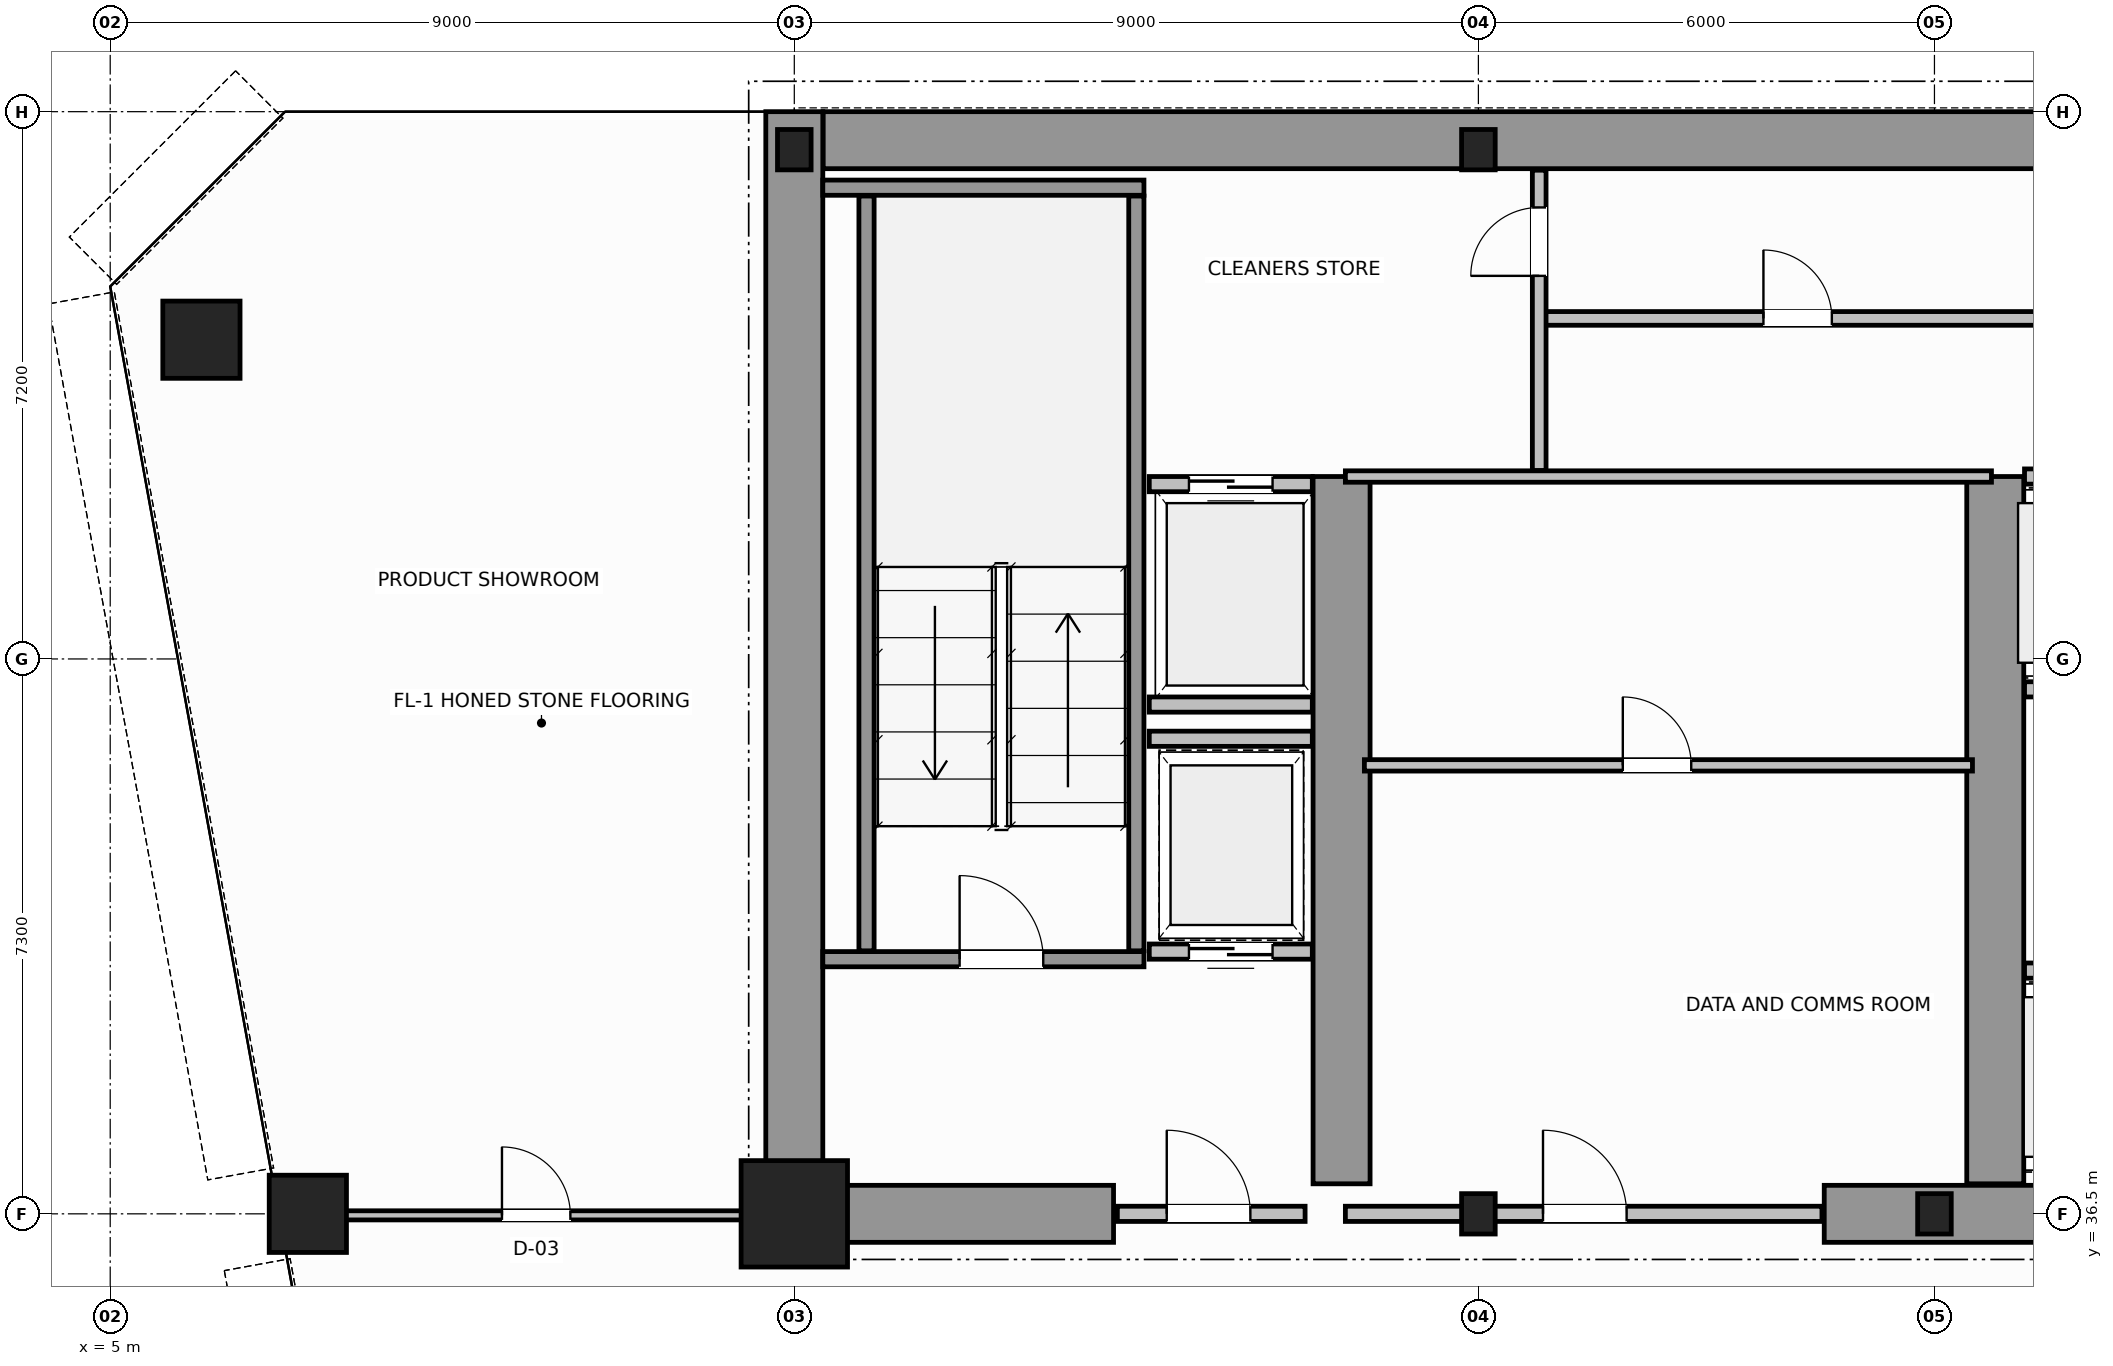
"""IFC4 building model, lengths in metres.
Left out: names, types, materials, properties, quantities, classifications, styles, units other than length and angle.
Written with IfcOpenShell. Run it as: python <this file> out.ifc"""

import sys

from ifc_helpers import new_model, si_unit, direction, frame, frame_2d, origin, origin_2d, place, context, subcontext, project, spatial, rectangle, hollow_circle, i_section, extrude, source, transform, mapped, element, fill, save


model = new_model("IFC4")
c1 = context("Model", 3, precision=1e-05, world=origin(), true_north=direction((0.0, 1.0)))
c2 = subcontext(c1, "Body", "Model", "MODEL_VIEW")
j1 = project(units=[si_unit("LENGTHUNIT", "METRE"), si_unit("PLANEANGLEUNIT", "RADIAN")], contexts=[c1])
p1 = place(None, origin())
s1 = spatial("IfcSite", under=j1, at=p1, CompositionType="ELEMENT")
p2 = place(p1, origin())
s2 = spatial("IfcBuilding", under=s1, at=p2, CompositionType="ELEMENT")
p3 = place(p2, frame((0.0, 0.0, 122.4)))
s3 = spatial("IfcBuildingStorey", under=s2, at=p3, CompositionType="ELEMENT", Elevation=122.4)
m1 = source(origin(), c2, "Body", "SweptSolid", [
    extrude(rectangle(XDim=1.4, YDim=1.4, at=origin_2d()), origin(), (0.0, 0.0, 1.0), 3.8),
])
p4 = place(p3, frame((14.0, 36.5, 0.0), z_axis=(0.0, 0.0, 1.0), x_axis=(1.0, 0.0, 0.0)))
e1 = element("IfcColumn", 1, at=p4, inside=s3, PredefinedType="COLUMN", context=c2, shape_type="MappedRepresentation", body=[
    mapped(m1, transform((0.0, 0.0, 0.0), scale=1.0)),
])
m2 = source(origin(), c2, "Body", "SweptSolid", [
    extrude(i_section(OverallWidth=0.442, OverallDepth=0.531, WebThickness=0.065, FlangeThickness=0.076, FilletRadius=0.015, at=origin_2d()), origin(), (0.0, 0.0, 1.0), 3.8),
])
for number, where, z_axis, x_axis in (
    (2, (23.0, 36.5, 0.0), (0.0, 0.0, 1.0), (1.0, 0.0, 0.0)),
    (3, (29.0, 36.5, 0.0), (0.0, 0.0, 1.0), (1.0, 0.0, 0.0)),
    (4, (14.0, 50.5, 0.0), (0.0, 0.0, 1.0), (1.0, 0.0, 0.0)),
    (5, (23.0, 50.5, 0.0), (0.0, 0.0, 1.0), (1.0, 0.0, 0.0)),
):
    element("IfcColumn", number, at=place(p3, frame(where, z_axis=z_axis, x_axis=x_axis)), inside=s3, PredefinedType="COLUMN", context=c2, shape_type="MappedRepresentation", body=[
        mapped(m2, transform((0.0, 0.0, 0.0), scale=1.0)),
    ])
m3 = source(origin(), c2, "Body", "SweptSolid", [
    extrude(hollow_circle(Radius=0.508, WallThickness=0.045, at=origin_2d()), origin(), (0.0, 0.0, 1.0), 3.8),
])
for number, where, z_axis, x_axis in (
    (6, (6.2, 48.0, 0.0), (0.0, 0.0, 1.0), (1.0, 0.0, 0.0)),
    (7, (7.6, 36.5, 0.0), (0.0, 0.0, 1.0), (1.0, 0.0, 0.0)),
):
    element("IfcColumn", number, at=place(p3, frame(where, z_axis=z_axis, x_axis=x_axis)), inside=s3, PredefinedType="COLUMN", context=c2, shape_type="MappedRepresentation", body=[
        mapped(m3, transform((0.0, 0.0, 0.0), scale=1.0)),
    ])
p5 = place(p3, frame((14.379, 50.625, 0.0), z_axis=(0.0, 0.0, 1.0), x_axis=(1.0, 0.0, 0.0)))
e8 = element("IfcWall", 8, at=p5, inside=s3, PredefinedType="SHEAR", context=c2, shape_type="SweptSolid", body=[
    extrude(rectangle(XDim=19.619, YDim=0.75, at=frame_2d((9.81, 0.0))), origin(), (0.0, 0.0, 1.0), 3.8),
])
p6 = place(p3, frame((14.0, 36.5, 0.0), z_axis=(0.0, 0.0, 1.0), x_axis=(0.0, 1.0, 0.0)))
e9 = element("IfcWall", 9, at=p6, inside=s3, PredefinedType="SHEAR", context=c2, shape_type="SweptSolid", body=[
    extrude(rectangle(XDim=14.5, YDim=0.75, at=frame_2d((7.25, 0.0))), origin(), (0.0, 0.0, 1.0), 3.8),
])
p7 = place(p3, frame((14.395, 36.5, 0.0), z_axis=(0.0, 0.0, 1.0), x_axis=(1.0, 0.0, 0.0)))
e10 = element("IfcWall", 10, at=p7, inside=s3, PredefinedType="SHEAR", context=c2, shape_type="SweptSolid", body=[
    extrude(rectangle(XDim=3.805, YDim=0.75, at=frame_2d((1.902, 0.0))), origin(), (0.0, 0.0, 1.0), 2.38),
])
p8 = place(p3, frame((27.55, 36.5, 0.0), z_axis=(0.0, 0.0, 1.0), x_axis=(1.0, 0.0, 0.0)))
e11 = element("IfcWall", 11, at=p8, inside=s3, PredefinedType="SHEAR", context=c2, shape_type="SweptSolid", body=[
    extrude(rectangle(XDim=4.5, YDim=0.75, at=frame_2d((2.25, 0.0))), origin(), (0.0, 0.0, 1.0), 3.8),
])
for number, where, z_axis, x_axis in (
    (12, (21.2, 36.895, 0.0), (0.0, 0.0, 1.0), (0.0, 1.0, 0.0)),
    (13, (29.8, 36.895, 0.0), (0.0, 0.0, 1.0), (0.0, 1.0, 0.0)),
):
    element("IfcWall", number, at=place(p3, frame(where, z_axis=z_axis, x_axis=x_axis)), inside=s3, PredefinedType="SHEAR", context=c2, shape_type="SweptSolid", body=[
        extrude(rectangle(XDim=9.305, YDim=0.75, at=frame_2d((4.652, 0.0))), origin(), (0.0, 0.0, 1.0), 3.8),
    ])
p9 = place(p3, frame((14.375, 39.85, 0.0), z_axis=(0.0, 0.0, 1.0), x_axis=(1.0, 0.0, 0.0)))
e14 = element("IfcWall", 14, at=p9, inside=s3, PredefinedType="SOLIDWALL", context=c2, shape_type="SweptSolid", body=[
    extrude(rectangle(XDim=4.225, YDim=0.2, at=frame_2d((2.113, 0.0))), origin(), (0.0, 0.0, 1.0), 3.8),
])
p10 = place(p9, frame((1.8, 0.0, 0.0)))
e15 = element("IfcOpeningElement", 15, at=p10, cuts=e14, PredefinedType="OPENING", context=c2, shape_type="SweptSolid", body=[
    extrude(rectangle(XDim=1.1, YDim=2.15, at=frame_2d((0.55, 1.075))), frame((0.0, 0.11, 0.0), z_axis=(0.0, -1.0, 0.0), x_axis=(1.0, 0.0, 0.0)), (0.0, 0.0, 1.0), 0.22),
])
p11 = place(p3, frame((14.375, 50.0, 0.0), z_axis=(0.0, 0.0, 1.0), x_axis=(1.0, 0.0, 0.0)))
e16 = element("IfcWall", 16, at=p11, inside=s3, PredefinedType="SOLIDWALL", context=c2, shape_type="SweptSolid", body=[
    extrude(rectangle(XDim=4.225, YDim=0.2, at=frame_2d((2.113, 0.0))), origin(), (0.0, 0.0, 1.0), 3.8),
])
for number, where, z_axis, x_axis in (
    (17, (14.95, 39.96, 0.0), (0.0, 0.0, 1.0), (0.0, 1.0, 0.0)),
    (18, (18.5, 39.96, 0.0), (0.0, 0.0, 1.0), (0.0, 1.0, 0.0)),
):
    element("IfcWall", number, at=place(p3, frame(where, z_axis=z_axis, x_axis=x_axis)), inside=s3, PredefinedType="SOLIDWALL", context=c2, shape_type="SweptSolid", body=[
        extrude(rectangle(XDim=9.93, YDim=0.2, at=frame_2d((4.965, 0.0))), origin(), (0.0, 0.0, 1.0), 3.8),
    ])
p12 = place(p3, frame((18.25, 36.5, 0.0), z_axis=(0.0, 0.0, 1.0), x_axis=(1.0, 0.0, 0.0)))
e19 = element("IfcWall", 19, at=p12, inside=s3, PredefinedType="SOLIDWALL", context=c2, shape_type="SweptSolid", body=[
    extrude(rectangle(XDim=2.47, YDim=0.2, at=frame_2d((1.235, 0.0))), origin(), (0.0, 0.0, 1.0), 2.37),
])
p13 = place(p12, frame((0.65, 0.0, 0.0)))
e20 = element("IfcOpeningElement", 20, at=p13, cuts=e19, PredefinedType="OPENING", context=c2, shape_type="SweptSolid", body=[
    extrude(rectangle(XDim=1.1, YDim=2.15, at=frame_2d((0.55, 1.075))), frame((0.0, 0.11, 0.0), z_axis=(0.0, -1.0, 0.0), x_axis=(1.0, 0.0, 0.0)), (0.0, 0.0, 1.0), 0.22),
])
p14 = place(p3, frame((30.185, 39.7, 0.0), z_axis=(0.0, 0.0, 1.0), x_axis=(1.0, 0.0, 0.0)))
e21 = element("IfcWall", 21, at=p14, inside=s3, PredefinedType="SOLIDWALL", context=c2, shape_type="SweptSolid", body=[
    extrude(rectangle(XDim=1.845, YDim=0.2, at=frame_2d((0.922, 0.0))), origin(), (0.0, 0.0, 1.0), 3.58),
])
p15 = place(p14, frame((0.373, 0.0, 0.0)))
e22 = element("IfcOpeningElement", 22, at=p15, cuts=e21, PredefinedType="OPENING", context=c2, shape_type="SweptSolid", body=[
    extrude(rectangle(XDim=1.1, YDim=2.15, at=frame_2d((0.55, 1.075))), frame((0.0, 0.11, 0.0), z_axis=(0.0, -1.0, 0.0), x_axis=(1.0, 0.0, 0.0)), (0.0, 0.0, 1.0), 0.22),
])
p16 = place(p3, frame((30.185, 43.4, 0.0), z_axis=(0.0, 0.0, 1.0), x_axis=(1.0, 0.0, 0.0)))
e23 = element("IfcWall", 23, at=p16, inside=s3, PredefinedType="SOLIDWALL", context=c2, shape_type="SweptSolid", body=[
    extrude(rectangle(XDim=1.725, YDim=0.2, at=frame_2d((0.862, 0.0))), origin(), (0.0, 0.0, 1.0), 3.58),
])
p17 = place(p16, frame((0.313, 0.0, 0.0)))
e24 = element("IfcOpeningElement", 24, at=p17, cuts=e23, PredefinedType="OPENING", context=c2, shape_type="SweptSolid", body=[
    extrude(rectangle(XDim=1.1, YDim=2.15, at=frame_2d((0.55, 1.075))), frame((0.0, 0.11, 0.0), z_axis=(0.0, -1.0, 0.0), x_axis=(1.0, 0.0, 0.0)), (0.0, 0.0, 1.0), 0.22),
])
p18 = place(p3, frame((30.185, 46.2, 0.0), z_axis=(0.0, 0.0, 1.0), x_axis=(1.0, 0.0, 0.0)))
e25 = element("IfcWall", 25, at=p18, inside=s3, PredefinedType="SOLIDWALL", context=c2, shape_type="SweptSolid", body=[
    extrude(rectangle(XDim=1.725, YDim=0.2, at=frame_2d((0.862, 0.0))), origin(), (0.0, 0.0, 1.0), 3.58),
])
p19 = place(p3, frame((18.67, 46.1, 0.0), z_axis=(0.0, 0.0, 1.0), x_axis=(1.0, 0.0, 0.0)))
e26 = element("IfcWall", 26, at=p19, inside=s3, PredefinedType="SOLIDWALL", context=c2, shape_type="SweptSolid", body=[
    extrude(rectangle(XDim=2.145, YDim=0.2, at=frame_2d((1.073, 0.0))), origin(), (0.0, 0.0, 1.0), 3.58),
])
p20 = place(p19, frame((0.522, 0.0, 0.0)))
e27 = element("IfcOpeningElement", 27, at=p20, cuts=e26, PredefinedType="OPENING", context=c2, shape_type="SweptSolid", body=[
    extrude(rectangle(XDim=1.1, YDim=2.15, at=frame_2d((0.55, 1.075))), frame((0.0, 0.11, 0.0), z_axis=(0.0, -1.0, 0.0), x_axis=(1.0, 0.0, 0.0)), (0.0, 0.0, 1.0), 0.22),
])
p21 = place(p3, frame((18.67, 43.2, 0.0), z_axis=(0.0, 0.0, 1.0), x_axis=(1.0, 0.0, 0.0)))
e28 = element("IfcWall", 28, at=p21, inside=s3, PredefinedType="SOLIDWALL", context=c2, shape_type="SweptSolid", body=[
    extrude(rectangle(XDim=2.145, YDim=0.2, at=frame_2d((1.073, 0.0))), origin(), (0.0, 0.0, 1.0), 3.58),
])
p22 = place(p3, frame((18.67, 39.95, 0.0), z_axis=(0.0, 0.0, 1.0), x_axis=(1.0, 0.0, 0.0)))
e29 = element("IfcWall", 29, at=p22, inside=s3, PredefinedType="SOLIDWALL", context=c2, shape_type="SweptSolid", body=[
    extrude(rectangle(XDim=2.145, YDim=0.2, at=frame_2d((1.073, 0.0))), origin(), (0.0, 0.0, 1.0), 3.58),
])
p23 = place(p22, frame((0.522, 0.0, 0.0)))
e30 = element("IfcOpeningElement", 30, at=p23, cuts=e29, PredefinedType="OPENING", context=c2, shape_type="SweptSolid", body=[
    extrude(rectangle(XDim=1.1, YDim=2.15, at=frame_2d((0.55, 1.075))), frame((0.0, 0.11, 0.0), z_axis=(0.0, -1.0, 0.0), x_axis=(1.0, 0.0, 0.0)), (0.0, 0.0, 1.0), 0.22),
])
p24 = place(p3, frame((18.67, 42.75, 0.0), z_axis=(0.0, 0.0, 1.0), x_axis=(1.0, 0.0, 0.0)))
e31 = element("IfcWall", 31, at=p24, inside=s3, PredefinedType="SOLIDWALL", context=c2, shape_type="SweptSolid", body=[
    extrude(rectangle(XDim=2.145, YDim=0.2, at=frame_2d((1.073, 0.0))), origin(), (0.0, 0.0, 1.0), 3.58),
])
p25 = place(p3, frame((21.25, 36.5, 0.0), z_axis=(0.0, 0.0, 1.0), x_axis=(1.0, 0.0, 0.0)))
e32 = element("IfcWall", 32, at=p25, inside=s3, PredefinedType="SOLIDWALL", context=c2, shape_type="SweptSolid", body=[
    extrude(rectangle(XDim=6.27, YDim=0.2, at=frame_2d((3.135, 0.0))), origin(), (0.0, 0.0, 1.0), 2.37),
])
p26 = place(p25, frame((2.6, 0.0, 0.0)))
e33 = element("IfcOpeningElement", 33, at=p26, cuts=e32, PredefinedType="OPENING", context=c2, shape_type="SweptSolid", body=[
    extrude(rectangle(XDim=1.1, YDim=2.15, at=frame_2d((0.55, 1.075))), frame((0.0, 0.11, 0.0), z_axis=(0.0, -1.0, 0.0), x_axis=(1.0, 0.0, 0.0)), (0.0, 0.0, 1.0), 0.22),
])
p27 = place(p3, frame((21.25, 46.2, 0.0), z_axis=(0.0, 0.0, 1.0), x_axis=(1.0, 0.0, 0.0)))
e34 = element("IfcWall", 34, at=p27, inside=s3, PredefinedType="PARTITIONING", context=c2, shape_type="SweptSolid", body=[
    extrude(rectangle(XDim=8.5, YDim=0.15, at=frame_2d((4.25, 0.0))), origin(), (0.0, 0.0, 1.0), 3.58),
])
p28 = place(p3, frame((21.5, 42.4, 0.0), z_axis=(0.0, 0.0, 1.0), x_axis=(1.0, 0.0, 0.0)))
e35 = element("IfcWall", 35, at=p28, inside=s3, PredefinedType="PARTITIONING", context=c2, shape_type="SweptSolid", body=[
    extrude(rectangle(XDim=8.0, YDim=0.15, at=frame_2d((4.0, 0.0))), origin(), (0.0, 0.0, 1.0), 3.58),
])
p29 = place(p28, frame((3.4, 0.0, 0.0)))
e36 = element("IfcOpeningElement", 36, at=p29, cuts=e35, PredefinedType="OPENING", context=c2, shape_type="SweptSolid", body=[
    extrude(rectangle(XDim=0.9, YDim=2.1, at=frame_2d((0.45, 1.05))), frame((0.0, 0.085, 0.0), z_axis=(0.0, -1.0, 0.0), x_axis=(1.0, 0.0, 0.0)), (0.0, 0.0, 1.0), 0.17),
])
p30 = place(p3, frame((23.85, 48.28, 0.0), z_axis=(0.0, 0.0, 1.0), x_axis=(1.0, 0.0, 0.0)))
e37 = element("IfcWall", 37, at=p30, inside=s3, PredefinedType="PLUMBINGWALL", context=c2, shape_type="SweptSolid", body=[
    extrude(rectangle(XDim=15.03, YDim=0.18, at=frame_2d((7.515, 0.0))), origin(), (0.0, 0.0, 1.0), 3.58),
])
p31 = place(p30, frame((2.9, 0.0, 0.0)))
e38 = element("IfcOpeningElement", 38, at=p31, cuts=e37, PredefinedType="OPENING", context=c2, shape_type="SweptSolid", body=[
    extrude(rectangle(XDim=0.9, YDim=2.15, at=frame_2d((0.45, 1.075))), frame((0.0, 0.1, 0.0), z_axis=(0.0, -1.0, 0.0), x_axis=(1.0, 0.0, 0.0)), (0.0, 0.0, 1.0), 0.2),
])
p32 = place(p30, frame((10.4, 0.0, 0.0)))
e39 = element("IfcOpeningElement", 39, at=p32, cuts=e37, PredefinedType="OPENING", context=c2, shape_type="SweptSolid", body=[
    extrude(rectangle(XDim=0.9, YDim=2.15, at=frame_2d((0.45, 1.075))), frame((0.0, 0.1, 0.0), z_axis=(0.0, -1.0, 0.0), x_axis=(1.0, 0.0, 0.0)), (0.0, 0.0, 1.0), 0.2),
])
p33 = place(p3, frame((23.8, 46.28, 0.0), z_axis=(0.0, 0.0, 1.0), x_axis=(0.0, 1.0, 0.0)))
e40 = element("IfcWall", 40, at=p33, inside=s3, PredefinedType="PLUMBINGWALL", context=c2, shape_type="SweptSolid", body=[
    extrude(rectangle(XDim=3.95, YDim=0.18, at=frame_2d((1.975, 0.0))), origin(), (0.0, 0.0, 1.0), 3.58),
])
p34 = place(p33, frame((2.56, 0.0, 0.0)))
e41 = element("IfcOpeningElement", 41, at=p34, cuts=e40, PredefinedType="OPENING", context=c2, shape_type="SweptSolid", body=[
    extrude(rectangle(XDim=0.9, YDim=2.15, at=frame_2d((0.45, 1.075))), frame((0.0, 0.1, 0.0), z_axis=(0.0, -1.0, 0.0), x_axis=(1.0, 0.0, 0.0)), (0.0, 0.0, 1.0), 0.2),
])
p35 = place(p3, frame((7.268, 36.48, 0.0), z_axis=(0.0, 0.0, 1.0), x_axis=(1.0, 0.0, 0.0)))
e42 = element("IfcWall", 42, at=p35, inside=s3, PredefinedType="PARTITIONING", context=c2, shape_type="SweptSolid", body=[
    extrude(rectangle(XDim=6.672, YDim=0.12, at=frame_2d((3.336, 0.0))), origin(), (0.0, 0.0, 1.0), 2.87),
])
p36 = place(p35, frame((2.886, 0.0, 0.0)))
e43 = element("IfcOpeningElement", 43, at=p36, cuts=e42, PredefinedType="OPENING", context=c2, shape_type="SweptSolid", body=[
    extrude(rectangle(XDim=0.9, YDim=2.15, at=frame_2d((0.45, 1.075))), frame((0.0, 0.07, 0.0), z_axis=(0.0, -1.0, 0.0), x_axis=(1.0, 0.0, 0.0)), (0.0, 0.0, 1.0), 0.14),
])
m4 = source(origin(), c2, "Body", "SweptSolid", [
    extrude(rectangle(XDim=1.1, YDim=2.15, at=frame_2d((0.55, 1.075))), frame((0.0, 0.025, 0.0), z_axis=(0.0, -1.0, 0.0), x_axis=(1.0, 0.0, 0.0)), (0.0, 0.0, 1.0), 0.05),
])
p37 = place(p10, origin())
e44 = element("IfcDoor", 44, at=p37, inside=s3, OperationType="SINGLE_SWING_LEFT", PredefinedType="DOOR", context=c2, shape_type="MappedRepresentation", body=[
    mapped(m4, transform((0.0, 0.0, 0.0), scale=1.0)),
])
fill(e15, e44)
p38 = place(p13, origin())
e45 = element("IfcDoor", 45, at=p38, inside=s3, OperationType="SINGLE_SWING_RIGHT", PredefinedType="DOOR", context=c2, shape_type="MappedRepresentation", body=[
    mapped(m4, transform((0.0, 0.0, 0.0), scale=1.0)),
])
fill(e20, e45)
p39 = place(p20, origin())
e46 = element("IfcDoor", 46, at=p39, inside=s3, OperationType="DOUBLE_DOOR_SLIDING", PredefinedType="DOOR", context=c2, shape_type="MappedRepresentation", body=[
    mapped(m4, transform((0.0, 0.0, 0.0), scale=1.0)),
])
fill(e27, e46)
p40 = place(p23, origin())
e47 = element("IfcDoor", 47, at=p40, inside=s3, OperationType="DOUBLE_DOOR_SLIDING", PredefinedType="DOOR", context=c2, shape_type="MappedRepresentation", body=[
    mapped(m4, transform((0.0, 0.0, 0.0), scale=1.0)),
])
fill(e30, e47)
p41 = place(p26, origin())
e48 = element("IfcDoor", 48, at=p41, inside=s3, OperationType="SINGLE_SWING_LEFT", PredefinedType="DOOR", context=c2, shape_type="MappedRepresentation", body=[
    mapped(m4, transform((0.0, 0.0, 0.0), scale=1.0)),
])
fill(e33, e48)
m5 = source(origin(), c2, "Body", "SweptSolid", [
    extrude(rectangle(XDim=0.9, YDim=2.1, at=frame_2d((0.45, 1.05))), frame((0.0, 0.025, 0.0), z_axis=(0.0, -1.0, 0.0), x_axis=(1.0, 0.0, 0.0)), (0.0, 0.0, 1.0), 0.05),
])
p42 = place(p29, origin())
e49 = element("IfcDoor", 49, at=p42, inside=s3, OperationType="SINGLE_SWING_RIGHT", PredefinedType="DOOR", context=c2, shape_type="MappedRepresentation", body=[
    mapped(m5, transform((0.0, 0.0, 0.0), scale=1.0)),
])
fill(e36, e49)
m6 = source(origin(), c2, "Body", "SweptSolid", [
    extrude(rectangle(XDim=0.9, YDim=2.15, at=frame_2d((0.45, 1.075))), frame((0.0, 0.025, 0.0), z_axis=(0.0, -1.0, 0.0), x_axis=(1.0, 0.0, 0.0)), (0.0, 0.0, 1.0), 0.05),
])
p43 = place(p34, origin())
e50 = element("IfcDoor", 50, at=p43, inside=s3, OperationType="SINGLE_SWING_LEFT", PredefinedType="DOOR", context=c2, shape_type="MappedRepresentation", body=[
    mapped(m6, transform((0.0, 0.0, 0.0), scale=1.0)),
])
fill(e41, e50)
p44 = place(p31, origin())
e51 = element("IfcDoor", 51, at=p44, inside=s3, OperationType="SINGLE_SWING_RIGHT", PredefinedType="DOOR", context=c2, shape_type="MappedRepresentation", body=[
    mapped(m6, transform((0.0, 0.0, 0.0), scale=1.0)),
])
fill(e38, e51)
p45 = place(p36, origin())
e52 = element("IfcDoor", 52, at=p45, inside=s3, OperationType="SINGLE_SWING_LEFT", PredefinedType="DOOR", context=c2, shape_type="MappedRepresentation", body=[
    mapped(m6, transform((0.0, 0.0, 0.0), scale=1.0)),
])
fill(e43, e52)
save(model, sys.argv[1])
